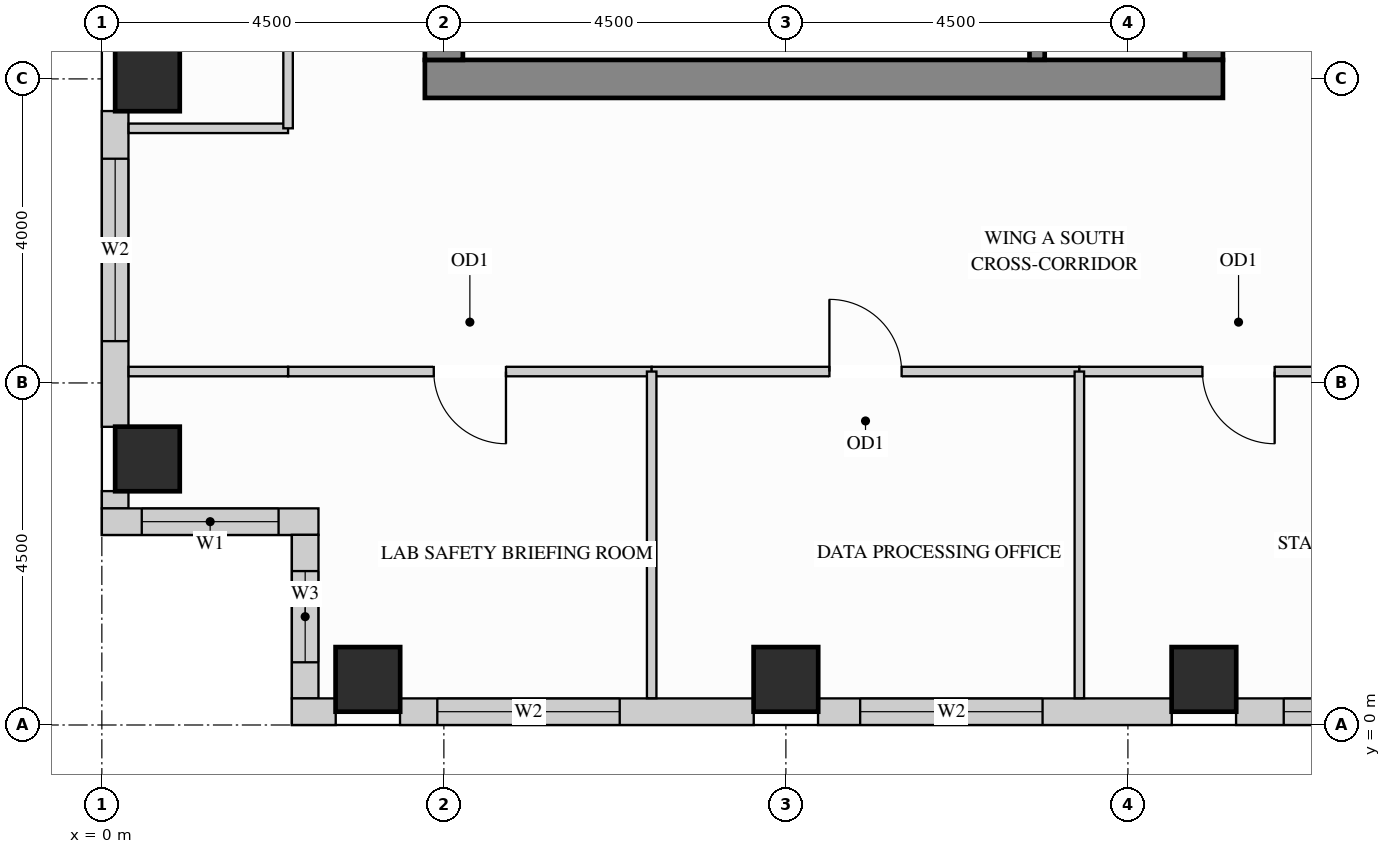
"""IFC4 building model, lengths in metres.
Left out: names, types, materials, properties, quantities, classifications, styles, units other than length and angle.
Written with IfcOpenShell. Run it as: python <this file> out.ifc"""

import sys

from ifc_helpers import new_model, si_unit, direction, frame, frame_2d, origin, origin_2d, place, context, subcontext, project, spatial, rectangle, extrude, source, transform, mapped, element, fill, save


model = new_model("IFC4")
c1 = context("Model", 3, precision=1e-05, world=origin(), true_north=direction((0.0, 1.0)))
c2 = subcontext(c1, "Body", "Model", "MODEL_VIEW")
j1 = project(units=[si_unit("LENGTHUNIT", "METRE"), si_unit("PLANEANGLEUNIT", "RADIAN")], contexts=[c1])
p1 = place(None, origin())
s1 = spatial("IfcSite", under=j1, at=p1, CompositionType="ELEMENT")
p2 = place(p1, origin())
s2 = spatial("IfcBuilding", under=s1, at=p2, CompositionType="ELEMENT")
p3 = place(p2, frame((0.0, 0.0, 230.4)))
s3 = spatial("IfcBuildingStorey", under=s2, at=p3, CompositionType="ELEMENT", Elevation=230.4)
m1 = source(origin(), c2, "Body", "SweptSolid", [
    extrude(rectangle(XDim=0.85, YDim=0.85, at=origin_2d()), origin(), (0.0, 0.0, 1.0), 3.4),
])
for number, where, z_axis, x_axis in (
    (1, (14.5, 0.6, 0.0), (0.0, 0.0, 1.0), (1.0, 0.0, 0.0)),
    (2, (3.5, 0.6, 0.0), (0.0, 0.0, 1.0), (1.0, 0.0, 0.0)),
    (3, (9.0, 0.6, 0.0), (0.0, 0.0, 1.0), (1.0, 0.0, 0.0)),
    (4, (0.6, 3.5, 0.0), (0.0, 0.0, 1.0), (1.0, 0.0, 0.0)),
    (5, (0.6, 8.5, 0.0), (0.0, 0.0, 1.0), (1.0, 0.0, 0.0)),
):
    element("IfcColumn", number, at=place(p3, frame(where, z_axis=z_axis, x_axis=x_axis)), inside=s3, PredefinedType="COLUMN", context=c2, shape_type="MappedRepresentation", body=[
        mapped(m1, transform((0.0, 0.0, 0.0), x_axis=(1.0, 0.0, 0.0), y_axis=(0.0, 1.0, 0.0), z_axis=(0.0, 0.0, 1.0))),
    ])
m2 = source(origin(), c2, "Body", "SweptSolid", [
    extrude(rectangle(XDim=10.07, YDim=0.5, at=frame_2d((5.035, 0.0))), origin(), (0.0, 0.0, 1.0), 3.4),
])
p4 = place(p3, frame((14.5, 8.75, 0.0), z_axis=(0.0, 0.0, 1.0), x_axis=(0.0, 1.0, 0.0)))
e6 = element("IfcWall", 6, at=p4, inside=s3, PredefinedType="SHEAR", context=c2, shape_type="MappedRepresentation", body=[
    mapped(m2, transform((0.0, 0.0, 0.0), x_axis=(1.0, 0.0, 0.0), y_axis=(0.0, 1.0, 0.0), z_axis=(0.0, 0.0, 1.0))),
])
m3 = source(origin(), c2, "Body", "SweptSolid", [
    extrude(rectangle(XDim=10.5, YDim=0.5, at=frame_2d((5.25, 0.0))), origin(), (0.0, 0.0, 1.0), 3.4),
])
p5 = place(p3, frame((4.25, 8.5, 0.0), z_axis=(0.0, 0.0, 1.0), x_axis=(1.0, 0.0, 0.0)))
e7 = element("IfcWall", 7, at=p5, inside=s3, PredefinedType="SHEAR", context=c2, shape_type="MappedRepresentation", body=[
    mapped(m3, transform((0.0, 0.0, 0.0), x_axis=(1.0, 0.0, 0.0), y_axis=(0.0, 1.0, 0.0), z_axis=(0.0, 0.0, 1.0))),
])
m4 = source(origin(), c2, "Body", "SweptSolid", [
    extrude(rectangle(XDim=20.5, YDim=0.5, at=frame_2d((10.25, 0.0))), origin(), (0.0, 0.0, 1.0), 3.4),
])
p6 = place(p3, frame((4.5, 8.75, 0.0), z_axis=(0.0, 0.0, 1.0), x_axis=(0.0, 1.0, 0.0)))
e8 = element("IfcWall", 8, at=p6, inside=s3, PredefinedType="SHEAR", context=c2, shape_type="MappedRepresentation", body=[
    mapped(m4, transform((0.0, 0.0, 0.0), x_axis=(1.0, 0.0, 0.0), y_axis=(0.0, 1.0, 0.0), z_axis=(0.0, 0.0, 1.0))),
])
p7 = place(p3, frame((0.175, 8.077, 0.0), z_axis=(0.0, 0.0, 1.0), x_axis=(0.0, -1.0, 0.0)))
e9 = element("IfcWall", 9, at=p7, inside=s3, PredefinedType="SOLIDWALL", context=c2, shape_type="SweptSolid", body=[
    extrude(rectangle(XDim=4.154, YDim=0.35, at=frame_2d((2.077, 0.0))), origin(), (0.0, 0.0, 1.0), 3.385),
])
p8 = place(p7, frame((0.627, 0.0, 0.78)))
e10 = element("IfcOpeningElement", 10, at=p8, cuts=e9, PredefinedType="OPENING", context=c2, shape_type="SweptSolid", body=[
    extrude(rectangle(XDim=2.4, YDim=2.1, at=frame_2d((1.2, 1.05))), frame((0.0, 0.185, 0.0), z_axis=(0.0, -1.0, 0.0), x_axis=(1.0, 0.0, 0.0)), (0.0, 0.0, 1.0), 0.37),
])
m5 = source(origin(), c2, "Body", "SweptSolid", [
    extrude(rectangle(XDim=0.229, YDim=0.35, at=frame_2d((0.115, 0.0))), origin(), (0.0, 0.0, 1.0), 3.385),
])
p9 = place(p3, frame((0.175, 3.077, 0.0), z_axis=(0.0, 0.0, 1.0), x_axis=(0.0, -1.0, 0.0)))
e11 = element("IfcWall", 11, at=p9, inside=s3, PredefinedType="SOLIDWALL", context=c2, shape_type="MappedRepresentation", body=[
    mapped(m5, transform((0.0, 0.0, 0.0), x_axis=(1.0, 0.0, 0.0), y_axis=(0.0, 1.0, 0.0), z_axis=(0.0, 0.0, 1.0))),
])
p10 = place(p3, frame((0.0, 2.675, 0.0), z_axis=(0.0, 0.0, 1.0), x_axis=(1.0, 0.0, 0.0)))
e12 = element("IfcWall", 12, at=p10, inside=s3, PredefinedType="SOLIDWALL", context=c2, shape_type="SweptSolid", body=[
    extrude(rectangle(XDim=2.85, YDim=0.35, at=frame_2d((1.425, 0.0))), origin(), (0.0, 0.0, 1.0), 3.385),
])
p11 = place(p10, frame((0.525, 0.0, 0.78)))
e13 = element("IfcOpeningElement", 13, at=p11, cuts=e12, PredefinedType="OPENING", context=c2, shape_type="SweptSolid", body=[
    extrude(rectangle(XDim=1.8, YDim=2.1, at=frame_2d((0.9, 1.05))), frame((0.0, 0.185, 0.0), z_axis=(0.0, -1.0, 0.0), x_axis=(1.0, 0.0, 0.0)), (0.0, 0.0, 1.0), 0.37),
])
p12 = place(p3, frame((2.675, 2.502, 0.0), z_axis=(0.0, 0.0, 1.0), x_axis=(0.0, -1.0, 0.0)))
e14 = element("IfcWall", 14, at=p12, inside=s3, PredefinedType="SOLIDWALL", context=c2, shape_type="SweptSolid", body=[
    extrude(rectangle(XDim=2.154, YDim=0.35, at=frame_2d((1.077, 0.0))), origin(), (0.0, 0.0, 1.0), 3.385),
])
p13 = place(p12, frame((0.477, 0.0, 0.78)))
e15 = element("IfcOpeningElement", 15, at=p13, cuts=e14, PredefinedType="OPENING", context=c2, shape_type="SweptSolid", body=[
    extrude(rectangle(XDim=1.2, YDim=2.1, at=frame_2d((0.6, 1.05))), frame((0.0, 0.185, 0.0), z_axis=(0.0, -1.0, 0.0), x_axis=(1.0, 0.0, 0.0)), (0.0, 0.0, 1.0), 0.37),
])
m6 = source(origin(), c2, "Body", "SweptSolid", [
    extrude(rectangle(XDim=0.577, YDim=0.35, at=frame_2d((0.289, 0.0))), origin(), (0.0, 0.0, 1.0), 3.385),
])
p14 = place(p3, frame((2.5, 0.175, 0.0), z_axis=(0.0, 0.0, 1.0), x_axis=(1.0, 0.0, 0.0)))
e16 = element("IfcWall", 16, at=p14, inside=s3, PredefinedType="SOLIDWALL", context=c2, shape_type="MappedRepresentation", body=[
    mapped(m6, transform((0.0, 0.0, 0.0), x_axis=(1.0, 0.0, 0.0), y_axis=(0.0, 1.0, 0.0), z_axis=(0.0, 0.0, 1.0))),
])
p15 = place(p3, frame((3.923, 0.175, 0.0), z_axis=(0.0, 0.0, 1.0), x_axis=(1.0, 0.0, 0.0)))
e17 = element("IfcWall", 17, at=p15, inside=s3, PredefinedType="SOLIDWALL", context=c2, shape_type="SweptSolid", body=[
    extrude(rectangle(XDim=4.654, YDim=0.35, at=frame_2d((2.327, 0.0))), origin(), (0.0, 0.0, 1.0), 3.385),
])
p16 = place(p15, frame((0.49, 0.0, 0.78)))
e18 = element("IfcOpeningElement", 18, at=p16, cuts=e17, PredefinedType="OPENING", context=c2, shape_type="SweptSolid", body=[
    extrude(rectangle(XDim=2.4, YDim=2.1, at=frame_2d((1.2, 1.05))), frame((0.0, 0.185, 0.0), z_axis=(0.0, -1.0, 0.0), x_axis=(1.0, 0.0, 0.0)), (0.0, 0.0, 1.0), 0.37),
])
p17 = place(p3, frame((9.423, 0.175, 0.0), z_axis=(0.0, 0.0, 1.0), x_axis=(1.0, 0.0, 0.0)))
e19 = element("IfcWall", 19, at=p17, inside=s3, PredefinedType="SOLIDWALL", context=c2, shape_type="SweptSolid", body=[
    extrude(rectangle(XDim=4.654, YDim=0.35, at=frame_2d((2.327, 0.0))), origin(), (0.0, 0.0, 1.0), 3.385),
])
p18 = place(p17, frame((0.554, 0.0, 0.78)))
e20 = element("IfcOpeningElement", 20, at=p18, cuts=e19, PredefinedType="OPENING", context=c2, shape_type="SweptSolid", body=[
    extrude(rectangle(XDim=2.4, YDim=2.1, at=frame_2d((1.2, 1.05))), frame((0.0, 0.185, 0.0), z_axis=(0.0, -1.0, 0.0), x_axis=(1.0, 0.0, 0.0)), (0.0, 0.0, 1.0), 0.37),
])
p19 = place(p3, frame((14.923, 0.175, 0.0), z_axis=(0.0, 0.0, 1.0), x_axis=(1.0, 0.0, 0.0)))
e21 = element("IfcWall", 21, at=p19, inside=s3, PredefinedType="SOLIDWALL", context=c2, shape_type="SweptSolid", body=[
    extrude(rectangle(XDim=3.654, YDim=0.35, at=frame_2d((1.827, 0.0))), origin(), (0.0, 0.0, 1.0), 3.385),
])
p20 = place(p19, frame((0.627, 0.0, 0.78)))
e22 = element("IfcOpeningElement", 22, at=p20, cuts=e21, PredefinedType="OPENING", context=c2, shape_type="SweptSolid", body=[
    extrude(rectangle(XDim=2.4, YDim=2.1, at=frame_2d((1.2, 1.05))), frame((0.0, 0.185, 0.0), z_axis=(0.0, -1.0, 0.0), x_axis=(1.0, 0.0, 0.0)), (0.0, 0.0, 1.0), 0.37),
])
m7 = source(origin(), c2, "Body", "SweptSolid", [
    extrude(rectangle(XDim=2.098, YDim=0.125, at=frame_2d((1.049, 0.0))), origin(), (0.0, 0.0, 1.0), 3.385),
])
p21 = place(p3, frame((0.352, 7.85, 0.0), z_axis=(0.0, 0.0, 1.0), x_axis=(1.0, 0.0, 0.0)))
e23 = element("IfcWall", 23, at=p21, inside=s3, PredefinedType="PARTITIONING", context=c2, shape_type="MappedRepresentation", body=[
    mapped(m7, transform((0.0, 0.0, 0.0), x_axis=(1.0, 0.0, 0.0), y_axis=(0.0, 1.0, 0.0), z_axis=(0.0, 0.0, 1.0))),
])
p22 = place(p3, frame((2.45, 4.65, 0.0), z_axis=(0.0, 0.0, 1.0), x_axis=(1.0, 0.0, 0.0)))
e24 = element("IfcWall", 24, at=p22, inside=s3, PredefinedType="PARTITIONING", context=c2, shape_type="SweptSolid", body=[
    extrude(rectangle(XDim=4.784, YDim=0.125, at=frame_2d((2.392, 0.0))), origin(), (0.0, 0.0, 1.0), 2.848),
])
p23 = place(p22, frame((1.917, 0.0, 0.0)))
e25 = element("IfcOpeningElement", 25, at=p23, cuts=e24, PredefinedType="OPENING", context=c2, shape_type="SweptSolid", body=[
    extrude(rectangle(XDim=0.95, YDim=2.15, at=frame_2d((0.475, 1.075))), frame((0.0, 0.073, 0.0), z_axis=(0.0, -1.0, 0.0), x_axis=(1.0, 0.0, 0.0)), (0.0, 0.0, 1.0), 0.145),
])
p24 = place(p3, frame((7.234, 4.65, 0.0), z_axis=(0.0, 0.0, 1.0), x_axis=(1.0, 0.0, 0.0)))
e26 = element("IfcWall", 26, at=p24, inside=s3, PredefinedType="PARTITIONING", context=c2, shape_type="SweptSolid", body=[
    extrude(rectangle(XDim=5.627, YDim=0.125, at=frame_2d((2.813, 0.0))), origin(), (0.0, 0.0, 1.0), 2.848),
])
p25 = place(p24, frame((2.338, 0.0, 0.0)))
e27 = element("IfcOpeningElement", 27, at=p25, cuts=e26, PredefinedType="OPENING", context=c2, shape_type="SweptSolid", body=[
    extrude(rectangle(XDim=0.95, YDim=2.15, at=frame_2d((0.475, 1.075))), frame((0.0, 0.073, 0.0), z_axis=(0.0, -1.0, 0.0), x_axis=(1.0, 0.0, 0.0)), (0.0, 0.0, 1.0), 0.145),
])
p26 = place(p3, frame((12.861, 4.65, 0.0), z_axis=(0.0, 0.0, 1.0), x_axis=(1.0, 0.0, 0.0)))
e28 = element("IfcWall", 28, at=p26, inside=s3, PredefinedType="PARTITIONING", context=c2, shape_type="SweptSolid", body=[
    extrude(rectangle(XDim=4.189, YDim=0.125, at=frame_2d((2.094, 0.0))), origin(), (0.0, 0.0, 1.0), 2.848),
])
p27 = place(p26, frame((1.619, 0.0, 0.0)))
e29 = element("IfcOpeningElement", 29, at=p27, cuts=e28, PredefinedType="OPENING", context=c2, shape_type="SweptSolid", body=[
    extrude(rectangle(XDim=0.95, YDim=2.15, at=frame_2d((0.475, 1.075))), frame((0.0, 0.073, 0.0), z_axis=(0.0, -1.0, 0.0), x_axis=(1.0, 0.0, 0.0)), (0.0, 0.0, 1.0), 0.145),
])
m8 = source(origin(), c2, "Body", "SweptSolid", [
    extrude(rectangle(XDim=2.098, YDim=0.125, at=frame_2d((1.049, 0.0))), origin(), (0.0, 0.0, 1.0), 2.848),
])
p28 = place(p3, frame((0.352, 4.65, 0.0), z_axis=(0.0, 0.0, 1.0), x_axis=(1.0, 0.0, 0.0)))
e30 = element("IfcWall", 30, at=p28, inside=s3, PredefinedType="PARTITIONING", context=c2, shape_type="MappedRepresentation", body=[
    mapped(m8, transform((0.0, 0.0, 0.0), x_axis=(1.0, 0.0, 0.0), y_axis=(0.0, 1.0, 0.0), z_axis=(0.0, 0.0, 1.0))),
])
m9 = source(origin(), c2, "Body", "SweptSolid", [
    extrude(rectangle(XDim=4.298, YDim=0.125, at=frame_2d((2.149, 0.0))), origin(), (0.0, 0.0, 1.0), 3.385),
])
for number, where, z_axis, x_axis in (
    (31, (7.234, 0.352, 0.0), (0.0, 0.0, 1.0), (0.0, 1.0, 0.0)),
    (32, (12.861, 0.352, 0.0), (0.0, 0.0, 1.0), (0.0, 1.0, 0.0)),
):
    element("IfcWall", number, at=place(p3, frame(where, z_axis=z_axis, x_axis=x_axis)), inside=s3, PredefinedType="PARTITIONING", context=c2, shape_type="MappedRepresentation", body=[
        mapped(m9, transform((0.0, 0.0, 0.0), x_axis=(1.0, 0.0, 0.0), y_axis=(0.0, 1.0, 0.0), z_axis=(0.0, 0.0, 1.0))),
    ])
p29 = place(p3, frame((2.45, 7.85, 0.0), z_axis=(0.0, 0.0, 1.0), x_axis=(0.0, 1.0, 0.0)))
e33 = element("IfcWall", 33, at=p29, inside=s3, PredefinedType="PARTITIONING", context=c2, shape_type="SweptSolid", body=[
    extrude(rectangle(XDim=7.25, YDim=0.125, at=frame_2d((3.625, 0.0))), origin(), (0.0, 0.0, 1.0), 3.385),
])
p30 = place(p29, frame((3.15, 0.0, 0.0)))
e34 = element("IfcOpeningElement", 34, at=p30, cuts=e33, PredefinedType="OPENING", context=c2, shape_type="SweptSolid", body=[
    extrude(rectangle(XDim=0.95, YDim=2.15, at=frame_2d((0.475, 1.075))), frame((0.0, 0.073, 0.0), z_axis=(0.0, -1.0, 0.0), x_axis=(1.0, 0.0, 0.0)), (0.0, 0.0, 1.0), 0.145),
])
m10 = source(origin(), c2, "Body", "SweptSolid", [
    extrude(rectangle(XDim=3.803, YDim=0.2, at=frame_2d((1.901, 0.0))), origin(), (0.0, 0.0, 1.0), 3.4),
])
p31 = place(p3, frame((12.305, 8.752, 0.0), z_axis=(0.0, 0.0, 1.0), x_axis=(0.0, 1.0, 0.0)))
e35 = element("IfcWall", 35, at=p31, inside=s3, PredefinedType="SHEAR", context=c2, shape_type="MappedRepresentation", body=[
    mapped(m10, transform((0.0, 0.0, 0.0), x_axis=(1.0, 0.0, 0.0), y_axis=(0.0, 1.0, 0.0), z_axis=(0.0, 0.0, 1.0))),
])
m11 = source(origin(), c2, "Body", "SweptSolid", [
    extrude(rectangle(XDim=0.95, YDim=2.15, at=frame_2d((0.475, 1.075))), frame((0.0, 0.025, 0.0), z_axis=(0.0, -1.0, 0.0), x_axis=(1.0, 0.0, 0.0)), (0.0, 0.0, 1.0), 0.05),
])
p32 = place(p23, origin())
e36 = element("IfcDoor", 36, at=p32, inside=s3, OperationType="SINGLE_SWING_RIGHT", PredefinedType="DOOR", context=c2, shape_type="MappedRepresentation", body=[
    mapped(m11, transform((0.0, 0.0, 0.0), x_axis=(1.0, 0.0, 0.0), y_axis=(0.0, 1.0, 0.0), z_axis=(0.0, 0.0, 1.0))),
])
fill(e25, e36)
p33 = place(p25, origin())
e37 = element("IfcDoor", 37, at=p33, inside=s3, OperationType="SINGLE_SWING_LEFT", PredefinedType="DOOR", context=c2, shape_type="MappedRepresentation", body=[
    mapped(m11, transform((0.0, 0.0, 0.0), x_axis=(1.0, 0.0, 0.0), y_axis=(0.0, 1.0, 0.0), z_axis=(0.0, 0.0, 1.0))),
])
fill(e27, e37)
p34 = place(p27, origin())
e38 = element("IfcDoor", 38, at=p34, inside=s3, OperationType="SINGLE_SWING_RIGHT", PredefinedType="DOOR", context=c2, shape_type="MappedRepresentation", body=[
    mapped(m11, transform((0.0, 0.0, 0.0), x_axis=(1.0, 0.0, 0.0), y_axis=(0.0, 1.0, 0.0), z_axis=(0.0, 0.0, 1.0))),
])
fill(e29, e38)
m12 = source(origin(), c2, "Body", "SweptSolid", [
    extrude(rectangle(XDim=1.8, YDim=2.1, at=frame_2d((0.9, 1.05))), frame((0.0, 0.03, 0.0), z_axis=(0.0, -1.0, 0.0), x_axis=(1.0, 0.0, 0.0)), (0.0, 0.0, 1.0), 0.06),
])
p35 = place(p11, origin())
e39 = element("IfcWindow", 39, at=p35, inside=s3, PartitioningType="SINGLE_PANEL", PredefinedType="WINDOW", context=c2, shape_type="MappedRepresentation", body=[
    mapped(m12, transform((0.0, 0.0, 0.0), x_axis=(1.0, 0.0, 0.0), y_axis=(0.0, 1.0, 0.0), z_axis=(0.0, 0.0, 1.0))),
])
fill(e13, e39)
m13 = source(origin(), c2, "Body", "SweptSolid", [
    extrude(rectangle(XDim=2.4, YDim=2.1, at=frame_2d((1.2, 1.05))), frame((0.0, 0.03, 0.0), z_axis=(0.0, -1.0, 0.0), x_axis=(1.0, 0.0, 0.0)), (0.0, 0.0, 1.0), 0.06),
])
p36 = place(p8, origin())
e40 = element("IfcWindow", 40, at=p36, inside=s3, PartitioningType="SINGLE_PANEL", PredefinedType="WINDOW", context=c2, shape_type="MappedRepresentation", body=[
    mapped(m13, transform((0.0, 0.0, 0.0), x_axis=(1.0, 0.0, 0.0), y_axis=(0.0, 1.0, 0.0), z_axis=(0.0, 0.0, 1.0))),
])
fill(e10, e40)
p37 = place(p16, origin())
e41 = element("IfcWindow", 41, at=p37, inside=s3, PartitioningType="SINGLE_PANEL", PredefinedType="WINDOW", context=c2, shape_type="MappedRepresentation", body=[
    mapped(m13, transform((0.0, 0.0, 0.0), x_axis=(1.0, 0.0, 0.0), y_axis=(0.0, 1.0, 0.0), z_axis=(0.0, 0.0, 1.0))),
])
fill(e18, e41)
p38 = place(p18, origin())
e42 = element("IfcWindow", 42, at=p38, inside=s3, PartitioningType="SINGLE_PANEL", PredefinedType="WINDOW", context=c2, shape_type="MappedRepresentation", body=[
    mapped(m13, transform((0.0, 0.0, 0.0), x_axis=(1.0, 0.0, 0.0), y_axis=(0.0, 1.0, 0.0), z_axis=(0.0, 0.0, 1.0))),
])
fill(e20, e42)
p39 = place(p20, origin())
e43 = element("IfcWindow", 43, at=p39, inside=s3, PartitioningType="SINGLE_PANEL", PredefinedType="WINDOW", context=c2, shape_type="MappedRepresentation", body=[
    mapped(m13, transform((0.0, 0.0, 0.0), x_axis=(1.0, 0.0, 0.0), y_axis=(0.0, 1.0, 0.0), z_axis=(0.0, 0.0, 1.0))),
])
fill(e22, e43)
m14 = source(origin(), c2, "Body", "SweptSolid", [
    extrude(rectangle(XDim=1.2, YDim=2.1, at=frame_2d((0.6, 1.05))), frame((0.0, 0.03, 0.0), z_axis=(0.0, -1.0, 0.0), x_axis=(1.0, 0.0, 0.0)), (0.0, 0.0, 1.0), 0.06),
])
p40 = place(p13, origin())
e44 = element("IfcWindow", 44, at=p40, inside=s3, PartitioningType="SINGLE_PANEL", PredefinedType="WINDOW", context=c2, shape_type="MappedRepresentation", body=[
    mapped(m14, transform((0.0, 0.0, 0.0), x_axis=(1.0, 0.0, 0.0), y_axis=(0.0, 1.0, 0.0), z_axis=(0.0, 0.0, 1.0))),
])
fill(e15, e44)
save(model, sys.argv[1])
